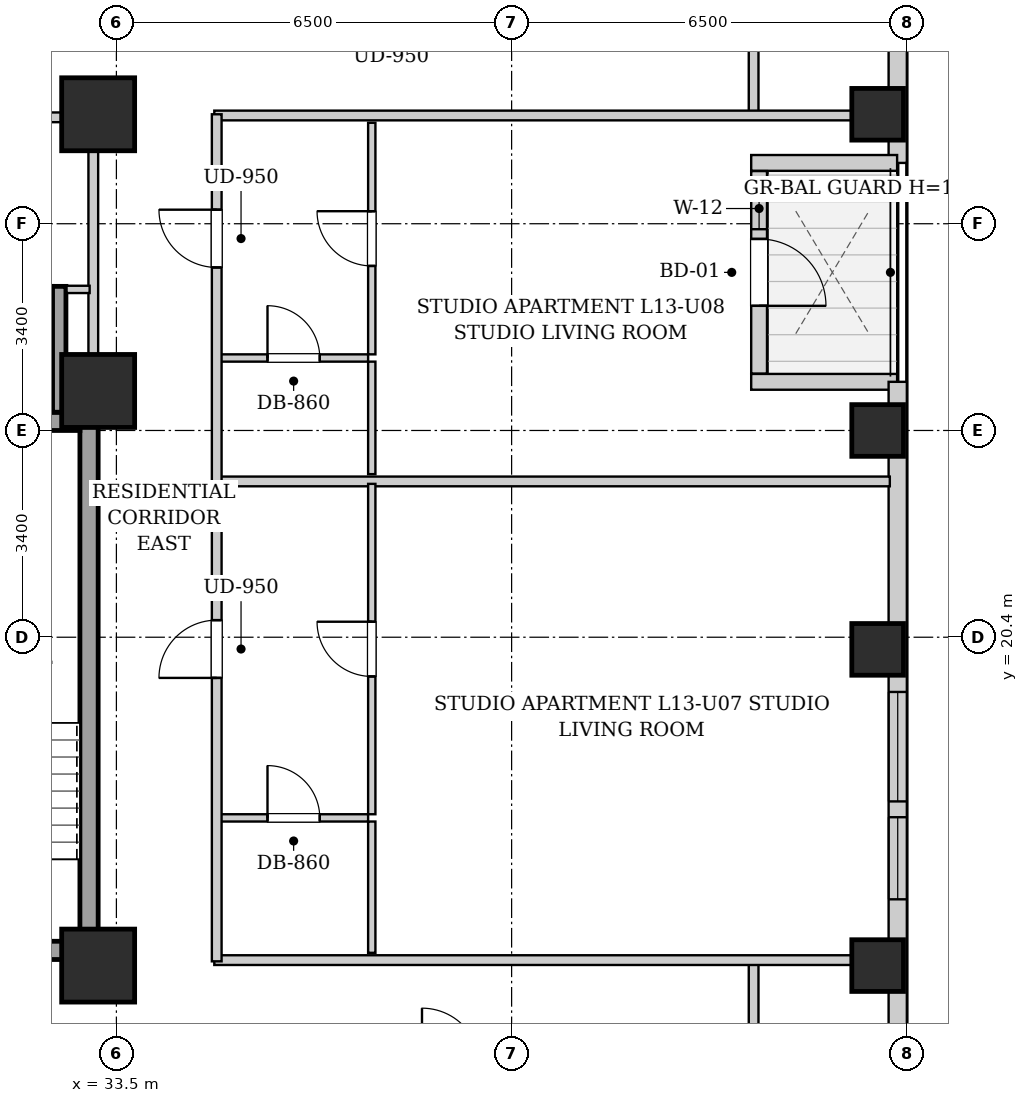
"""IFC4 building model, lengths in metres.
Left out: names, types, materials, properties, quantities, classifications, styles, units other than length and angle.
Written with IfcOpenShell. Run it as: python <this file> out.ifc"""

import sys

from ifc_helpers import new_model, si_unit, direction, frame, frame_2d, origin, origin_2d, place, context, subcontext, project, spatial, rectangle, extrude, element, fill, save


model = new_model("IFC4")
c1 = context("Model", 3, precision=1e-05, world=origin(), true_north=direction((0.0, 1.0)))
c2 = subcontext(c1, "Body", "Model", "MODEL_VIEW")
j1 = project(units=[si_unit("LENGTHUNIT", "METRE"), si_unit("PLANEANGLEUNIT", "RADIAN")], contexts=[c1])
p1 = place(None, origin())
s1 = spatial("IfcSite", under=j1, at=p1, CompositionType="ELEMENT")
p2 = place(p1, origin())
s2 = spatial("IfcBuilding", under=s1, at=p2, CompositionType="ELEMENT")
p3 = place(p2, frame((0.0, 0.0, 51.4)))
s3 = spatial("IfcBuildingStorey", under=s2, at=p3, CompositionType="ELEMENT", Elevation=51.4)
for number, where, z_axis, x_axis in (
    (1, (46.02, 15.0, 0.0), (0.0, 0.0, 1.0), (1.0, 0.0, 0.0)),
    (2, (46.02, 20.2, 0.0), (0.0, 0.0, 1.0), (1.0, 0.0, 0.0)),
    (3, (46.02, 23.8, 0.0), (0.0, 0.0, 1.0), (1.0, 0.0, 0.0)),
    (4, (46.02, 29.0, 0.0), (0.0, 0.0, 1.0), (1.0, 0.0, 0.0)),
):
    element("IfcColumn", number, at=place(p3, frame(where, z_axis=z_axis, x_axis=x_axis)), inside=s3, PredefinedType="COLUMN", context=c2, shape_type="SweptSolid", body=[
        extrude(rectangle(XDim=0.85, YDim=0.85, at=origin_2d()), origin(), (0.0, 0.0, 1.0), 3.2),
    ])
for number, where, z_axis, x_axis in (
    (5, (33.2, 15.0, 0.0), (0.0, 0.0, 1.0), (1.0, 0.0, 0.0)),
    (6, (33.2, 29.0, 0.0), (0.0, 0.0, 1.0), (1.0, 0.0, 0.0)),
    (7, (33.2, 24.45, 0.0), (0.0, 0.0, 1.0), (1.0, 0.0, 0.0)),
):
    element("IfcColumn", number, at=place(p3, frame(where, z_axis=z_axis, x_axis=x_axis)), inside=s3, PredefinedType="COLUMN", context=c2, shape_type="SweptSolid", body=[
        extrude(rectangle(XDim=1.2, YDim=1.2, at=origin_2d()), origin(), (0.0, 0.0, 1.0), 3.2),
    ])
p4 = place(p3, frame((46.35, 45.1, 0.0), z_axis=(0.0, 0.0, 1.0), x_axis=(0.0, -1.0, 0.0)))
e8 = element("IfcWall", 8, at=p4, inside=s3, PredefinedType="SOLIDWALL", context=c2, shape_type="SweptSolid", body=[
    extrude(rectangle(XDim=16.9, YDim=0.3, at=frame_2d((8.45, 0.0))), origin(), (0.0, 0.0, 1.0), 1.975),
])
p5 = place(p4, frame((3.715, 0.0, 0.55)))
e9 = element("IfcOpeningElement", 9, at=p5, cuts=e8, PredefinedType="OPENING", context=c2, shape_type="SweptSolid", body=[
    extrude(rectangle(XDim=1.8, YDim=1.2, at=frame_2d((0.9, 0.6))), frame((0.0, 0.16, 0.0), z_axis=(0.0, -1.0, 0.0), x_axis=(1.0, 0.0, 0.0)), (0.0, 0.0, 1.0), 0.32),
])
p6 = place(p4, frame((1.185, 0.0, 0.55)))
e10 = element("IfcOpeningElement", 10, at=p6, cuts=e8, PredefinedType="OPENING", context=c2, shape_type="SweptSolid", body=[
    extrude(rectangle(XDim=1.35, YDim=1.2, at=frame_2d((0.675, 0.6))), frame((0.0, 0.16, 0.0), z_axis=(0.0, -1.0, 0.0), x_axis=(1.0, 0.0, 0.0)), (0.0, 0.0, 1.0), 0.32),
])
p7 = place(p3, frame((46.34, 28.2, 0.0), z_axis=(0.0, 0.0, 1.0), x_axis=(-1.0, 0.0, 0.0)))
e11 = element("IfcWall", 11, at=p7, inside=s3, PredefinedType="SOLIDWALL", context=c2, shape_type="SweptSolid", body=[
    extrude(rectangle(XDim=2.4, YDim=0.26, at=frame_2d((1.2, 0.0))), origin(), (0.0, 0.0, 1.0), 2.94),
])
p8 = place(p3, frame((44.07, 28.066, 0.0), z_axis=(0.0, 0.0, 1.0), x_axis=(0.0, -1.0, 0.0)))
e12 = element("IfcWall", 12, at=p8, inside=s3, PredefinedType="SOLIDWALL", context=c2, shape_type="SweptSolid", body=[
    extrude(rectangle(XDim=3.332, YDim=0.26, at=frame_2d((1.666, 0.0))), origin(), (0.0, 0.0, 1.0), 2.94),
])
p9 = place(p8, frame((1.116, 0.0, 0.0)))
e13 = element("IfcOpeningElement", 13, at=p9, cuts=e12, PredefinedType="OPENING", context=c2, shape_type="SweptSolid", body=[
    extrude(rectangle(XDim=1.1, YDim=2.0, at=frame_2d((0.55, 1.0))), frame((0.0, 0.14, 0.0), z_axis=(0.0, -1.0, 0.0), x_axis=(1.0, 0.0, 0.0)), (0.0, 0.0, 1.0), 0.28),
])
p10 = place(p8, frame((0.276, 0.0, 0.55)))
e14 = element("IfcOpeningElement", 14, at=p10, cuts=e12, PredefinedType="OPENING", context=c2, shape_type="SweptSolid", body=[
    extrude(rectangle(XDim=0.68, YDim=1.2, at=frame_2d((0.34, 0.6))), frame((0.0, 0.14, 0.0), z_axis=(0.0, -1.0, 0.0), x_axis=(1.0, 0.0, 0.0)), (0.0, 0.0, 1.0), 0.28),
])
p11 = place(p3, frame((43.94, 24.6, 0.0), z_axis=(0.0, 0.0, 1.0), x_axis=(1.0, 0.0, 0.0)))
e15 = element("IfcWall", 15, at=p11, inside=s3, PredefinedType="SOLIDWALL", context=c2, shape_type="SweptSolid", body=[
    extrude(rectangle(XDim=2.4, YDim=0.26, at=frame_2d((1.2, 0.0))), origin(), (0.0, 0.0, 1.0), 2.94),
])
p12 = place(p3, frame((46.35, 24.6, 0.0), z_axis=(0.0, 0.0, 1.0), x_axis=(0.0, -1.0, 0.0)))
e16 = element("IfcWall", 16, at=p12, inside=s3, PredefinedType="SOLIDWALL", context=c2, shape_type="SweptSolid", body=[
    extrude(rectangle(XDim=22.1, YDim=0.3, at=frame_2d((11.05, 0.0))), origin(), (0.0, 0.0, 1.0), 1.975),
])
p13 = place(p12, frame((17.141, 0.0, 0.55)))
e17 = element("IfcOpeningElement", 17, at=p13, cuts=e16, PredefinedType="OPENING", context=c2, shape_type="SweptSolid", body=[
    extrude(rectangle(XDim=1.8, YDim=1.2, at=frame_2d((0.9, 0.6))), frame((0.0, 0.16, 0.0), z_axis=(0.0, -1.0, 0.0), x_axis=(1.0, 0.0, 0.0)), (0.0, 0.0, 1.0), 0.32),
])
p14 = place(p12, frame((14.465, 0.0, 0.55)))
e18 = element("IfcOpeningElement", 18, at=p14, cuts=e16, PredefinedType="OPENING", context=c2, shape_type="SweptSolid", body=[
    extrude(rectangle(XDim=1.35, YDim=1.2, at=frame_2d((0.675, 0.6))), frame((0.0, 0.16, 0.0), z_axis=(0.0, -1.0, 0.0), x_axis=(1.0, 0.0, 0.0)), (0.0, 0.0, 1.0), 0.32),
])
p15 = place(p12, frame((5.1, 0.0, 0.55)))
e19 = element("IfcOpeningElement", 19, at=p15, cuts=e16, PredefinedType="OPENING", context=c2, shape_type="SweptSolid", body=[
    extrude(rectangle(XDim=1.8, YDim=1.2, at=frame_2d((0.9, 0.6))), frame((0.0, 0.16, 0.0), z_axis=(0.0, -1.0, 0.0), x_axis=(1.0, 0.0, 0.0)), (0.0, 0.0, 1.0), 0.32),
])
p16 = place(p12, frame((7.16, 0.0, 0.55)))
e20 = element("IfcOpeningElement", 20, at=p16, cuts=e16, PredefinedType="OPENING", context=c2, shape_type="SweptSolid", body=[
    extrude(rectangle(XDim=1.35, YDim=1.2, at=frame_2d((0.675, 0.6))), frame((0.0, 0.16, 0.0), z_axis=(0.0, -1.0, 0.0), x_axis=(1.0, 0.0, 0.0)), (0.0, 0.0, 1.0), 0.32),
])
p17 = place(p3, frame((33.05, 15.1, 0.0), z_axis=(0.0, 0.0, 1.0), x_axis=(0.0, 1.0, 0.0)))
e21 = element("IfcWall", 21, at=p17, inside=s3, PredefinedType="SHEAR", context=c2, shape_type="SweptSolid", body=[
    extrude(rectangle(XDim=9.0, YDim=0.3, at=frame_2d((4.5, 0.0))), origin(), (0.0, 0.0, 1.0), 2.94),
])
p18 = place(p3, frame((30.05, 23.95, 0.0), z_axis=(0.0, 0.0, 1.0), x_axis=(1.0, 0.0, 0.0)))
e22 = element("IfcWall", 22, at=p18, inside=s3, PredefinedType="SHEAR", context=c2, shape_type="SweptSolid", body=[
    extrude(rectangle(XDim=2.85, YDim=0.3, at=frame_2d((1.425, 0.0))), origin(), (0.0, 0.0, 1.0), 2.94),
])
p19 = place(p3, frame((30.05, 15.25, 0.0), z_axis=(0.0, 0.0, 1.0), x_axis=(1.0, 0.0, 0.0)))
e23 = element("IfcWall", 23, at=p19, inside=s3, PredefinedType="SHEAR", context=c2, shape_type="SweptSolid", body=[
    extrude(rectangle(XDim=2.85, YDim=0.3, at=frame_2d((1.425, 0.0))), origin(), (0.0, 0.0, 1.0), 2.94),
])
p20 = place(p19, frame((0.86, 0.0, 0.0)))
e24 = element("IfcOpeningElement", 24, at=p20, cuts=e23, PredefinedType="OPENING", context=c2, shape_type="SweptSolid", body=[
    extrude(rectangle(XDim=1.1, YDim=2.05, at=frame_2d((0.55, 1.025))), frame((0.0, 0.16, 0.0), z_axis=(0.0, -1.0, 0.0), x_axis=(1.0, 0.0, 0.0)), (0.0, 0.0, 1.0), 0.32),
])
p21 = place(p3, frame((32.56, 24.1, 0.0), z_axis=(0.0, 0.0, 1.0), x_axis=(0.0, 1.0, 0.0)))
e25 = element("IfcWall", 25, at=p21, inside=s3, PredefinedType="SHEAR", context=c2, shape_type="SweptSolid", body=[
    extrude(rectangle(XDim=2.07, YDim=0.22, at=frame_2d((1.035, 0.0))), origin(), (0.0, 0.0, 1.0), 2.94),
])
p22 = place(p3, frame((33.12, 24.12, 0.0), z_axis=(0.0, 0.0, 1.0), x_axis=(0.0, 1.0, 0.0)))
e26 = element("IfcWall", 26, at=p22, inside=s3, PredefinedType="PARTITIONING", context=c2, shape_type="SweptSolid", body=[
    extrude(rectangle(XDim=4.76, YDim=0.16, at=frame_2d((2.38, 0.0))), origin(), (0.0, 0.0, 1.0), 2.94),
])
p23 = place(p3, frame((32.68, 26.12, 0.0), z_axis=(0.0, 0.0, 1.0), x_axis=(1.0, 0.0, 0.0)))
e27 = element("IfcWall", 27, at=p23, inside=s3, PredefinedType="PARTITIONING", context=c2, shape_type="SweptSolid", body=[
    extrude(rectangle(XDim=0.38, YDim=0.12, at=frame_2d((0.19, 0.0))), origin(), (0.0, 0.0, 1.0), 2.94),
])
p24 = place(p3, frame((30.08, 28.95, 0.0), z_axis=(0.0, 0.0, 1.0), x_axis=(1.0, 0.0, 0.0)))
e28 = element("IfcWall", 28, at=p24, inside=s3, PredefinedType="PARTITIONING", context=c2, shape_type="SweptSolid", body=[
    extrude(rectangle(XDim=2.96, YDim=0.16, at=frame_2d((1.48, 0.0))), origin(), (0.0, 0.0, 1.0), 2.94),
])
p25 = place(p24, frame((0.695, 0.0, 0.0)))
e29 = element("IfcOpeningElement", 29, at=p25, cuts=e28, PredefinedType="OPENING", context=c2, shape_type="SweptSolid", body=[
    extrude(rectangle(XDim=0.86, YDim=2.05, at=frame_2d((0.43, 1.025))), frame((0.0, 0.09, 0.0), z_axis=(0.0, -1.0, 0.0), x_axis=(1.0, 0.0, 0.0)), (0.0, 0.0, 1.0), 0.18),
])
for number, where, z_axis, x_axis in (
    (30, (43.98, 13.35, 0.0), (0.0, 0.0, 1.0), (0.0, 1.0, 0.0)),
    (31, (43.98, 28.98, 0.0), (0.0, 0.0, 1.0), (0.0, 1.0, 0.0)),
):
    element("IfcWall", number, at=place(p3, frame(where, z_axis=z_axis, x_axis=x_axis)), inside=s3, PredefinedType="PARTITIONING", context=c2, shape_type="SweptSolid", body=[
        extrude(rectangle(XDim=1.74, YDim=0.16, at=frame_2d((0.87, 0.0))), origin(), (0.0, 0.0, 1.0), 2.94),
    ])
for number, where, z_axis, x_axis in (
    (32, (35.11, 15.09, 0.0), (0.0, 0.0, 1.0), (1.0, 0.0, 0.0)),
    (33, (35.11, 28.98, 0.0), (0.0, 0.0, 1.0), (1.0, 0.0, 0.0)),
):
    element("IfcWall", number, at=place(p3, frame(where, z_axis=z_axis, x_axis=x_axis)), inside=s3, PredefinedType="PARTITIONING", context=c2, shape_type="SweptSolid", body=[
        extrude(rectangle(XDim=11.11, YDim=0.16, at=frame_2d((5.555, 0.0))), origin(), (0.0, 0.0, 1.0), 2.232),
    ])
p26 = place(p3, frame((35.19, 22.962, 0.0), z_axis=(0.0, 0.0, 1.0), x_axis=(1.0, 0.0, 0.0)))
e34 = element("IfcWall", 34, at=p26, inside=s3, PredefinedType="PARTITIONING", context=c2, shape_type="SweptSolid", body=[
    extrude(rectangle(XDim=11.03, YDim=0.16, at=frame_2d((5.515, 0.0))), origin(), (0.0, 0.0, 1.0), 2.94),
])
p27 = place(p3, frame((35.19, 17.429, 0.0), z_axis=(0.0, 0.0, 1.0), x_axis=(1.0, 0.0, 0.0)))
e35 = element("IfcWall", 35, at=p27, inside=s3, PredefinedType="PARTITIONING", context=c2, shape_type="SweptSolid", body=[
    extrude(rectangle(XDim=2.45, YDim=0.12, at=frame_2d((1.225, 0.0))), origin(), (0.0, 0.0, 1.0), 2.94),
])
p28 = place(p27, frame((0.795, 0.0, 0.0)))
e36 = element("IfcOpeningElement", 36, at=p28, cuts=e35, PredefinedType="OPENING", context=c2, shape_type="SweptSolid", body=[
    extrude(rectangle(XDim=0.86, YDim=2.05, at=frame_2d((0.43, 1.025))), frame((0.0, 0.07, 0.0), z_axis=(0.0, -1.0, 0.0), x_axis=(1.0, 0.0, 0.0)), (0.0, 0.0, 1.0), 0.14),
])
p29 = place(p3, frame((37.7, 15.21, 0.0), z_axis=(0.0, 0.0, 1.0), x_axis=(0.0, 1.0, 0.0)))
e37 = element("IfcWall", 37, at=p29, inside=s3, PredefinedType="PARTITIONING", context=c2, shape_type="SweptSolid", body=[
    extrude(rectangle(XDim=2.159, YDim=0.12, at=frame_2d((1.08, 0.0))), origin(), (0.0, 0.0, 1.0), 2.94),
])
p30 = place(p3, frame((37.7, 17.489, 0.0), z_axis=(0.0, 0.0, 1.0), x_axis=(0.0, 1.0, 0.0)))
e38 = element("IfcWall", 38, at=p30, inside=s3, PredefinedType="PARTITIONING", context=c2, shape_type="SweptSolid", body=[
    extrude(rectangle(XDim=5.433, YDim=0.12, at=frame_2d((2.717, 0.0))), origin(), (0.0, 0.0, 1.0), 2.94),
])
p31 = place(p30, frame((2.266, 0.0, 0.0)))
e39 = element("IfcOpeningElement", 39, at=p31, cuts=e38, PredefinedType="OPENING", context=c2, shape_type="SweptSolid", body=[
    extrude(rectangle(XDim=0.9, YDim=2.05, at=frame_2d((0.45, 1.025))), frame((0.0, 0.07, 0.0), z_axis=(0.0, -1.0, 0.0), x_axis=(1.0, 0.0, 0.0)), (0.0, 0.0, 1.0), 0.14),
])
p32 = place(p3, frame((35.19, 24.992, 0.0), z_axis=(0.0, 0.0, 1.0), x_axis=(1.0, 0.0, 0.0)))
e40 = element("IfcWall", 40, at=p32, inside=s3, PredefinedType="PARTITIONING", context=c2, shape_type="SweptSolid", body=[
    extrude(rectangle(XDim=2.45, YDim=0.12, at=frame_2d((1.225, 0.0))), origin(), (0.0, 0.0, 1.0), 2.94),
])
p33 = place(p32, frame((0.795, 0.0, 0.0)))
e41 = element("IfcOpeningElement", 41, at=p33, cuts=e40, PredefinedType="OPENING", context=c2, shape_type="SweptSolid", body=[
    extrude(rectangle(XDim=0.86, YDim=2.05, at=frame_2d((0.43, 1.025))), frame((0.0, 0.07, 0.0), z_axis=(0.0, -1.0, 0.0), x_axis=(1.0, 0.0, 0.0)), (0.0, 0.0, 1.0), 0.14),
])
p34 = place(p3, frame((37.7, 23.082, 0.0), z_axis=(0.0, 0.0, 1.0), x_axis=(0.0, 1.0, 0.0)))
e42 = element("IfcWall", 42, at=p34, inside=s3, PredefinedType="PARTITIONING", context=c2, shape_type="SweptSolid", body=[
    extrude(rectangle(XDim=1.85, YDim=0.12, at=frame_2d((0.925, 0.0))), origin(), (0.0, 0.0, 1.0), 2.94),
])
p35 = place(p3, frame((37.7, 25.052, 0.0), z_axis=(0.0, 0.0, 1.0), x_axis=(0.0, 1.0, 0.0)))
e43 = element("IfcWall", 43, at=p35, inside=s3, PredefinedType="PARTITIONING", context=c2, shape_type="SweptSolid", body=[
    extrude(rectangle(XDim=3.808, YDim=0.12, at=frame_2d((1.904, 0.0))), origin(), (0.0, 0.0, 1.0), 2.94),
])
p36 = place(p35, frame((1.454, 0.0, 0.0)))
e44 = element("IfcOpeningElement", 44, at=p36, cuts=e43, PredefinedType="OPENING", context=c2, shape_type="SweptSolid", body=[
    extrude(rectangle(XDim=0.9, YDim=2.05, at=frame_2d((0.45, 1.025))), frame((0.0, 0.07, 0.0), z_axis=(0.0, -1.0, 0.0), x_axis=(1.0, 0.0, 0.0)), (0.0, 0.0, 1.0), 0.14),
])
p37 = place(p3, frame((35.15, 15.07, 0.0), z_axis=(0.0, 0.0, 1.0), x_axis=(0.0, 1.0, 0.0)))
e45 = element("IfcWall", 45, at=p37, inside=s3, PredefinedType="PARTITIONING", context=c2, shape_type="SweptSolid", body=[
    extrude(rectangle(XDim=13.93, YDim=0.16, at=frame_2d((6.965, 0.0))), origin(), (0.0, 0.0, 1.0), 2.94),
])
p38 = place(p37, frame((4.661, 0.0, 0.0)))
e46 = element("IfcOpeningElement", 46, at=p38, cuts=e45, PredefinedType="OPENING", context=c2, shape_type="SweptSolid", body=[
    extrude(rectangle(XDim=0.95, YDim=2.1, at=frame_2d((0.475, 1.05))), frame((0.0, 0.09, 0.0), z_axis=(0.0, -1.0, 0.0), x_axis=(1.0, 0.0, 0.0)), (0.0, 0.0, 1.0), 0.18),
])
p39 = place(p37, frame((11.411, 0.0, 0.0)))
e47 = element("IfcOpeningElement", 47, at=p39, cuts=e45, PredefinedType="OPENING", context=c2, shape_type="SweptSolid", body=[
    extrude(rectangle(XDim=0.95, YDim=2.1, at=frame_2d((0.475, 1.05))), frame((0.0, 0.09, 0.0), z_axis=(0.0, -1.0, 0.0), x_axis=(1.0, 0.0, 0.0)), (0.0, 0.0, 1.0), 0.18),
])
p40 = place(p28, origin())
e48 = element("IfcDoor", 48, at=p40, inside=s3, OperationType="SINGLE_SWING_LEFT", PredefinedType="DOOR", context=c2, shape_type="SweptSolid", body=[
    extrude(rectangle(XDim=0.86, YDim=2.05, at=frame_2d((0.43, 1.025))), frame((0.0, 0.025, 0.0), z_axis=(0.0, -1.0, 0.0), x_axis=(1.0, 0.0, 0.0)), (0.0, 0.0, 1.0), 0.05),
])
fill(e36, e48)
p41 = place(p31, origin())
e49 = element("IfcDoor", 49, at=p41, inside=s3, OperationType="SINGLE_SWING_RIGHT", PredefinedType="DOOR", context=c2, shape_type="SweptSolid", body=[
    extrude(rectangle(XDim=0.9, YDim=2.05, at=frame_2d((0.45, 1.025))), frame((0.0, 0.025, 0.0), z_axis=(0.0, -1.0, 0.0), x_axis=(1.0, 0.0, 0.0)), (0.0, 0.0, 1.0), 0.05),
])
fill(e39, e49)
p42 = place(p33, origin())
e50 = element("IfcDoor", 50, at=p42, inside=s3, OperationType="SINGLE_SWING_LEFT", PredefinedType="DOOR", context=c2, shape_type="SweptSolid", body=[
    extrude(rectangle(XDim=0.86, YDim=2.05, at=frame_2d((0.43, 1.025))), frame((0.0, 0.025, 0.0), z_axis=(0.0, -1.0, 0.0), x_axis=(1.0, 0.0, 0.0)), (0.0, 0.0, 1.0), 0.05),
])
fill(e41, e50)
p43 = place(p36, origin())
e51 = element("IfcDoor", 51, at=p43, inside=s3, OperationType="SINGLE_SWING_RIGHT", PredefinedType="DOOR", context=c2, shape_type="SweptSolid", body=[
    extrude(rectangle(XDim=0.9, YDim=2.05, at=frame_2d((0.45, 1.025))), frame((0.0, 0.025, 0.0), z_axis=(0.0, -1.0, 0.0), x_axis=(1.0, 0.0, 0.0)), (0.0, 0.0, 1.0), 0.05),
])
fill(e44, e51)
p44 = place(p38, origin())
e52 = element("IfcDoor", 52, at=p44, inside=s3, OperationType="SINGLE_SWING_LEFT", PredefinedType="DOOR", context=c2, shape_type="SweptSolid", body=[
    extrude(rectangle(XDim=0.95, YDim=2.1, at=frame_2d((0.475, 1.05))), frame((0.0, 0.025, 0.0), z_axis=(0.0, -1.0, 0.0), x_axis=(1.0, 0.0, 0.0)), (0.0, 0.0, 1.0), 0.05),
])
fill(e46, e52)
p45 = place(p39, origin())
e53 = element("IfcDoor", 53, at=p45, inside=s3, OperationType="SINGLE_SWING_RIGHT", PredefinedType="DOOR", context=c2, shape_type="SweptSolid", body=[
    extrude(rectangle(XDim=0.95, YDim=2.1, at=frame_2d((0.475, 1.05))), frame((0.0, 0.025, 0.0), z_axis=(0.0, -1.0, 0.0), x_axis=(1.0, 0.0, 0.0)), (0.0, 0.0, 1.0), 0.05),
])
fill(e47, e53)
p46 = place(p9, origin())
e54 = element("IfcDoor", 54, at=p46, inside=s3, OperationType="SINGLE_SWING_RIGHT", PredefinedType="DOOR", context=c2, shape_type="SweptSolid", body=[
    extrude(rectangle(XDim=1.1, YDim=2.0, at=frame_2d((0.55, 1.0))), frame((0.0, 0.025, 0.0), z_axis=(0.0, -1.0, 0.0), x_axis=(1.0, 0.0, 0.0)), (0.0, 0.0, 1.0), 0.05),
])
fill(e13, e54)
p47 = place(p15, origin())
e55 = element("IfcWindow", 55, at=p47, inside=s3, PartitioningType="DOUBLE_PANEL_VERTICAL", PredefinedType="WINDOW", context=c2, shape_type="SweptSolid", body=[
    extrude(rectangle(XDim=1.8, YDim=1.2, at=frame_2d((0.9, 0.6))), frame((0.0, 0.03, 0.0), z_axis=(0.0, -1.0, 0.0), x_axis=(1.0, 0.0, 0.0)), (0.0, 0.0, 1.0), 0.06),
])
fill(e19, e55)
p48 = place(p16, origin())
e56 = element("IfcWindow", 56, at=p48, inside=s3, PartitioningType="SINGLE_PANEL", PredefinedType="WINDOW", context=c2, shape_type="SweptSolid", body=[
    extrude(rectangle(XDim=1.35, YDim=1.2, at=frame_2d((0.675, 0.6))), frame((0.0, 0.03, 0.0), z_axis=(0.0, -1.0, 0.0), x_axis=(1.0, 0.0, 0.0)), (0.0, 0.0, 1.0), 0.06),
])
fill(e20, e56)
p49 = place(p10, origin())
e57 = element("IfcWindow", 57, at=p49, inside=s3, PartitioningType="SINGLE_PANEL", PredefinedType="WINDOW", context=c2, shape_type="SweptSolid", body=[
    extrude(rectangle(XDim=0.68, YDim=1.2, at=frame_2d((0.34, 0.6))), frame((0.0, 0.03, 0.0), z_axis=(0.0, -1.0, 0.0), x_axis=(1.0, 0.0, 0.0)), (0.0, 0.0, 1.0), 0.06),
])
fill(e14, e57)
save(model, sys.argv[1])
